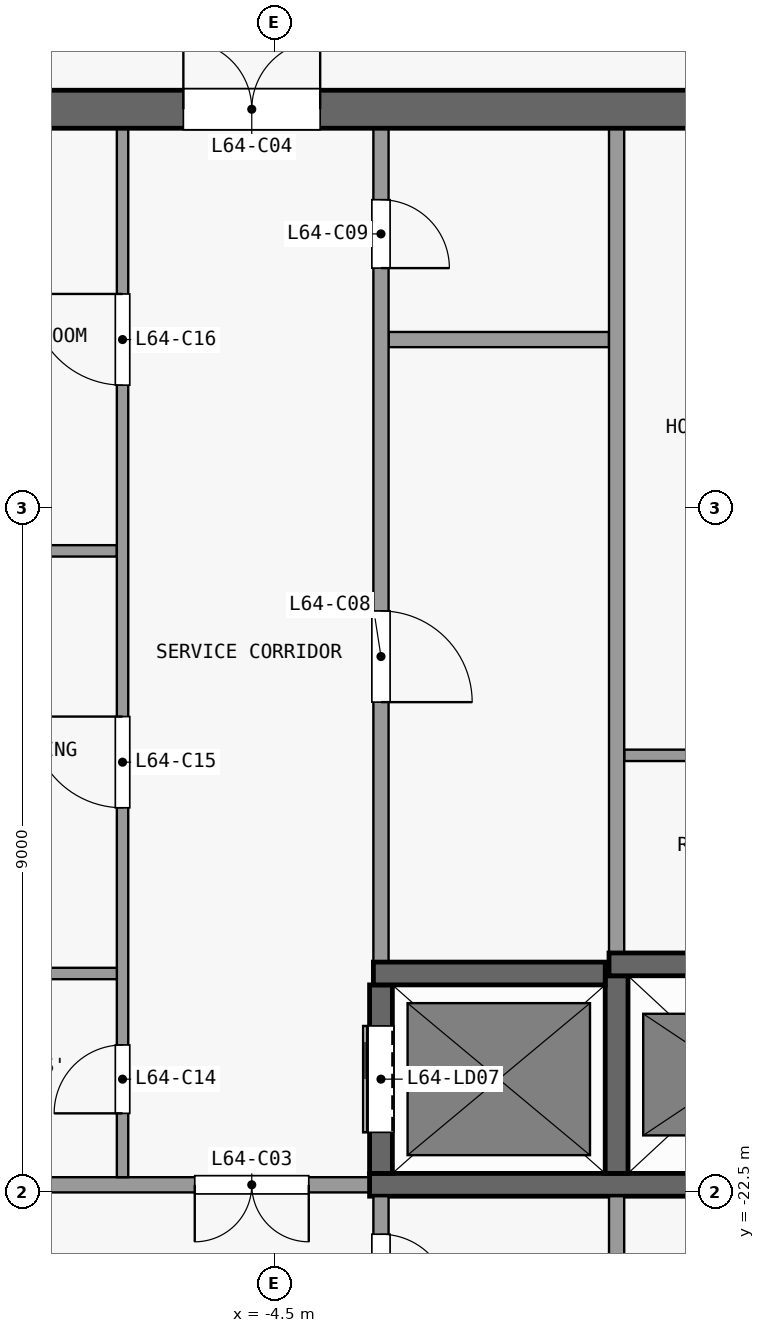
"""IFC4 building model, lengths in metres.
Left out: names, types, materials, properties, quantities, classifications, styles, units other than length and angle.
Written with IfcOpenShell. Run it as: python <this file> out.ifc"""

import sys

from ifc_helpers import new_model, si_unit, direction, frame, frame_2d, origin, place, context, subcontext, project, spatial, rectangle, extrude, element, fill, save


model = new_model("IFC4")
c1 = context("Model", 3, precision=1e-05, world=origin(), true_north=direction((0.0, 1.0)))
c2 = subcontext(c1, "Body", "Model", "MODEL_VIEW")
j1 = project(units=[si_unit("LENGTHUNIT", "METRE"), si_unit("PLANEANGLEUNIT", "RADIAN")], contexts=[c1])
p1 = place(None, origin())
s1 = spatial("IfcSite", under=j1, at=p1, CompositionType="ELEMENT")
p2 = place(p1, origin())
s2 = spatial("IfcBuilding", under=s1, at=p2, CompositionType="ELEMENT")
p3 = place(p2, frame((0.0, 0.0, 255.5)))
s3 = spatial("IfcBuildingStorey", under=s2, at=p3, CompositionType="ELEMENT", Elevation=255.5)
p4 = place(p3, frame((-13.1, -8.25, 0.0), z_axis=(0.0, 0.0, 1.0), x_axis=(1.0, 0.0, 0.0)))
e1 = element("IfcWall", 1, at=p4, inside=s3, PredefinedType="SHEAR", context=c2, shape_type="SweptSolid", body=[
    extrude(rectangle(XDim=26.2, YDim=0.5, at=frame_2d((13.1, 0.0))), origin(), (0.0, 0.0, 1.0), 3.3),
])
p5 = place(p4, frame((7.4, 0.0, 0.0)))
e2 = element("IfcOpeningElement", 2, at=p5, cuts=e1, PredefinedType="OPENING", context=c2, shape_type="SweptSolid", body=[
    extrude(rectangle(XDim=1.8, YDim=2.1, at=frame_2d((0.9, 1.05))), frame((0.0, 0.26, 0.0), z_axis=(0.0, -1.0, 0.0), x_axis=(1.0, 0.0, 0.0)), (0.0, 0.0, 1.0), 0.52),
])
p6 = place(p4, frame((17.0, 0.0, 0.0)))
e3 = element("IfcOpeningElement", 3, at=p6, cuts=e1, PredefinedType="OPENING", context=c2, shape_type="SweptSolid", body=[
    extrude(rectangle(XDim=1.8, YDim=2.1, at=frame_2d((0.9, 1.05))), frame((0.0, 0.26, 0.0), z_axis=(0.0, -1.0, 0.0), x_axis=(1.0, 0.0, 0.0)), (0.0, 0.0, 1.0), 0.52),
])
p7 = place(p4, frame((2.325, 0.0, 0.0)))
e4 = element("IfcOpeningElement", 4, at=p7, cuts=e1, PredefinedType="OPENING", context=c2, shape_type="SweptSolid", body=[
    extrude(rectangle(XDim=0.9, YDim=2.1, at=frame_2d((0.45, 1.05))), frame((0.0, 0.26, 0.0), z_axis=(0.0, -1.0, 0.0), x_axis=(1.0, 0.0, 0.0)), (0.0, 0.0, 1.0), 0.52),
])
p8 = place(p4, frame((23.675, 0.0, 0.0)))
e5 = element("IfcOpeningElement", 5, at=p8, cuts=e1, PredefinedType="OPENING", context=c2, shape_type="SweptSolid", body=[
    extrude(rectangle(XDim=1.2, YDim=2.1, at=frame_2d((0.6, 1.05))), frame((0.0, 0.26, 0.0), z_axis=(0.0, -1.0, 0.0), x_axis=(1.0, 0.0, 0.0)), (0.0, 0.0, 1.0), 0.52),
])
p9 = place(p3, frame((-3.25, -22.4, 0.0), z_axis=(0.0, 0.0, 1.0), x_axis=(-1.0, 0.0, 0.0)))
e6 = element("IfcWall", 6, at=p9, inside=s3, PredefinedType="PARTITIONING", context=c2, shape_type="SweptSolid", body=[
    extrude(rectangle(XDim=6.2, YDim=0.2, at=frame_2d((3.1, 0.0))), origin(), (0.0, 0.0, 1.0), 3.3),
])
p10 = place(p9, frame((0.8, 0.0, 0.0)))
e7 = element("IfcOpeningElement", 7, at=p10, cuts=e6, PredefinedType="OPENING", context=c2, shape_type="SweptSolid", body=[
    extrude(rectangle(XDim=1.5, YDim=2.1, at=frame_2d((0.75, 1.05))), frame((0.0, 0.11, 0.0), z_axis=(0.0, -1.0, 0.0), x_axis=(1.0, 0.0, 0.0)), (0.0, 0.0, 1.0), 0.22),
])
p11 = place(p3, frame((-3.25, -22.4, 0.0), z_axis=(0.0, 0.0, 1.0), x_axis=(1.0, 0.0, 0.0)))
e8 = element("IfcWall", 8, at=p11, inside=s3, PredefinedType="SHEAR", context=c2, shape_type="SweptSolid", body=[
    extrude(rectangle(XDim=6.5, YDim=0.3, at=frame_2d((3.25, 0.0))), origin(), (0.0, 0.0, 1.0), 3.3),
])
p12 = place(p3, frame((-9.45, -19.62, 0.0), z_axis=(0.0, 0.0, 1.0), x_axis=(1.0, 0.0, 0.0)))
e9 = element("IfcWall", 9, at=p12, inside=s3, PredefinedType="PARTITIONING", context=c2, shape_type="SweptSolid", body=[
    extrude(rectangle(XDim=2.875, YDim=0.15, at=frame_2d((1.438, 0.0))), origin(), (0.0, 0.0, 1.0), 3.3),
])
p13 = place(p3, frame((-3.2, -19.62, 0.0), z_axis=(0.0, 0.0, 1.0), x_axis=(1.0, 0.0, 0.0)))
e10 = element("IfcWall", 10, at=p13, inside=s3, PredefinedType="SHEAR", context=c2, shape_type="SweptSolid", body=[
    extrude(rectangle(XDim=3.05, YDim=0.3, at=frame_2d((1.525, 0.0))), origin(), (0.0, 0.0, 1.0), 3.3),
])
p14 = place(p3, frame((-0.1, -19.5, 0.0), z_axis=(0.0, 0.0, 1.0), x_axis=(1.0, 0.0, 0.0)))
e11 = element("IfcWall", 11, at=p14, inside=s3, PredefinedType="SHEAR", context=c2, shape_type="SweptSolid", body=[
    extrude(rectangle(XDim=3.275, YDim=0.3, at=frame_2d((1.638, 0.0))), origin(), (0.0, 0.0, 1.0), 3.3),
])
p15 = place(p3, frame((0.1, -16.75, 0.0), z_axis=(0.0, 0.0, 1.0), x_axis=(1.0, 0.0, 0.0)))
e12 = element("IfcWall", 12, at=p15, inside=s3, PredefinedType="PARTITIONING", context=c2, shape_type="SweptSolid", body=[
    extrude(rectangle(XDim=2.925, YDim=0.15, at=frame_2d((1.462, 0.0))), origin(), (0.0, 0.0, 1.0), 3.3),
])
p16 = place(p3, frame((-9.5, -14.06, 0.0), z_axis=(0.0, 0.0, 1.0), x_axis=(1.0, 0.0, 0.0)))
e13 = element("IfcWall", 13, at=p16, inside=s3, PredefinedType="PARTITIONING", context=c2, shape_type="SweptSolid", body=[
    extrude(rectangle(XDim=2.925, YDim=0.15, at=frame_2d((1.462, 0.0))), origin(), (0.0, 0.0, 1.0), 3.3),
])
p17 = place(p3, frame((-3.0, -11.28, 0.0), z_axis=(0.0, 0.0, 1.0), x_axis=(1.0, 0.0, 0.0)))
e14 = element("IfcWall", 14, at=p17, inside=s3, PredefinedType="PARTITIONING", context=c2, shape_type="SweptSolid", body=[
    extrude(rectangle(XDim=2.9, YDim=0.2, at=frame_2d((1.45, 0.0))), origin(), (0.0, 0.0, 1.0), 3.3),
])
p18 = place(p3, frame((-6.5, -22.3, 0.0), z_axis=(0.0, 0.0, 1.0), x_axis=(0.0, 1.0, 0.0)))
e15 = element("IfcWall", 15, at=p18, inside=s3, PredefinedType="PARTITIONING", context=c2, shape_type="SweptSolid", body=[
    extrude(rectangle(XDim=13.8, YDim=0.15, at=frame_2d((6.9, 0.0))), origin(), (0.0, 0.0, 1.0), 3.3),
])
p19 = place(p18, frame((0.84, 0.0, 0.0)))
e16 = element("IfcOpeningElement", 16, at=p19, cuts=e15, PredefinedType="OPENING", context=c2, shape_type="SweptSolid", body=[
    extrude(rectangle(XDim=0.9, YDim=2.1, at=frame_2d((0.45, 1.05))), frame((0.0, 0.085, 0.0), z_axis=(0.0, -1.0, 0.0), x_axis=(1.0, 0.0, 0.0)), (0.0, 0.0, 1.0), 0.17),
])
p20 = place(p18, frame((4.86, 0.0, 0.0)))
e17 = element("IfcOpeningElement", 17, at=p20, cuts=e15, PredefinedType="OPENING", context=c2, shape_type="SweptSolid", body=[
    extrude(rectangle(XDim=1.2, YDim=2.1, at=frame_2d((0.6, 1.05))), frame((0.0, 0.085, 0.0), z_axis=(0.0, -1.0, 0.0), x_axis=(1.0, 0.0, 0.0)), (0.0, 0.0, 1.0), 0.17),
])
p21 = place(p18, frame((10.42, 0.0, 0.0)))
e18 = element("IfcOpeningElement", 18, at=p21, cuts=e15, PredefinedType="OPENING", context=c2, shape_type="SweptSolid", body=[
    extrude(rectangle(XDim=1.2, YDim=2.1, at=frame_2d((0.6, 1.05))), frame((0.0, 0.085, 0.0), z_axis=(0.0, -1.0, 0.0), x_axis=(1.0, 0.0, 0.0)), (0.0, 0.0, 1.0), 0.17),
])
p22 = place(p3, frame((-3.1, -22.55, 0.0), z_axis=(0.0, 0.0, 1.0), x_axis=(0.0, -1.0, 0.0)))
e19 = element("IfcWall", 19, at=p22, inside=s3, PredefinedType="PARTITIONING", context=c2, shape_type="SweptSolid", body=[
    extrude(rectangle(XDim=2.05, YDim=0.2, at=frame_2d((1.025, 0.0))), origin(), (0.0, 0.0, 1.0), 3.3),
])
p23 = place(p22, frame((0.5, 0.0, 0.0)))
e20 = element("IfcOpeningElement", 20, at=p23, cuts=e19, PredefinedType="OPENING", context=c2, shape_type="SweptSolid", body=[
    extrude(rectangle(XDim=0.9, YDim=2.1, at=frame_2d((0.45, 1.05))), frame((0.0, 0.11, 0.0), z_axis=(0.0, -1.0, 0.0), x_axis=(1.0, 0.0, 0.0)), (0.0, 0.0, 1.0), 0.22),
])
p24 = place(p3, frame((-3.1, -22.25, 0.0), z_axis=(0.0, 0.0, 1.0), x_axis=(0.0, 1.0, 0.0)))
e21 = element("IfcWall", 21, at=p24, inside=s3, PredefinedType="SHEAR", context=c2, shape_type="SweptSolid", body=[
    extrude(rectangle(XDim=2.48, YDim=0.3, at=frame_2d((1.24, 0.0))), origin(), (0.0, 0.0, 1.0), 3.3),
])
p25 = place(p24, frame((0.54, 0.0, 0.0)))
e22 = element("IfcOpeningElement", 22, at=p25, cuts=e21, PredefinedType="OPENING", context=c2, shape_type="SweptSolid", body=[
    extrude(rectangle(XDim=1.4, YDim=2.1, at=frame_2d((0.7, 1.05))), frame((0.0, 0.16, 0.0), z_axis=(0.0, -1.0, 0.0), x_axis=(1.0, 0.0, 0.0)), (0.0, 0.0, 1.0), 0.32),
])
p26 = place(p3, frame((-3.1, -8.5, 0.0), z_axis=(0.0, 0.0, 1.0), x_axis=(0.0, -1.0, 0.0)))
e23 = element("IfcWall", 23, at=p26, inside=s3, PredefinedType="PARTITIONING", context=c2, shape_type="SweptSolid", body=[
    extrude(rectangle(XDim=10.97, YDim=0.2, at=frame_2d((5.485, 0.0))), origin(), (0.0, 0.0, 1.0), 3.3),
])
p27 = place(p26, frame((6.35, 0.0, 0.0)))
e24 = element("IfcOpeningElement", 24, at=p27, cuts=e23, PredefinedType="OPENING", context=c2, shape_type="SweptSolid", body=[
    extrude(rectangle(XDim=1.2, YDim=2.1, at=frame_2d((0.6, 1.05))), frame((0.0, 0.11, 0.0), z_axis=(0.0, -1.0, 0.0), x_axis=(1.0, 0.0, 0.0)), (0.0, 0.0, 1.0), 0.22),
])
p28 = place(p26, frame((0.94, 0.0, 0.0)))
e25 = element("IfcOpeningElement", 25, at=p28, cuts=e23, PredefinedType="OPENING", context=c2, shape_type="SweptSolid", body=[
    extrude(rectangle(XDim=0.9, YDim=2.1, at=frame_2d((0.45, 1.05))), frame((0.0, 0.11, 0.0), z_axis=(0.0, -1.0, 0.0), x_axis=(1.0, 0.0, 0.0)), (0.0, 0.0, 1.0), 0.22),
])
p29 = place(p3, frame((0.0, -24.6, 0.0), z_axis=(0.0, 0.0, 1.0), x_axis=(0.0, 1.0, 0.0)))
e26 = element("IfcWall", 26, at=p29, inside=s3, PredefinedType="PARTITIONING", context=c2, shape_type="SweptSolid", body=[
    extrude(rectangle(XDim=2.05, YDim=0.2, at=frame_2d((1.025, 0.0))), origin(), (0.0, 0.0, 1.0), 3.3),
])
p30 = place(p3, frame((0.0, -22.25, 0.0), z_axis=(0.0, 0.0, 1.0), x_axis=(0.0, 1.0, 0.0)))
e27 = element("IfcWall", 27, at=p30, inside=s3, PredefinedType="SHEAR", context=c2, shape_type="SweptSolid", body=[
    extrude(rectangle(XDim=2.6, YDim=0.3, at=frame_2d((1.3, 0.0))), origin(), (0.0, 0.0, 1.0), 3.3),
])
p31 = place(p3, frame((0.0, -19.35, 0.0), z_axis=(0.0, 0.0, 1.0), x_axis=(0.0, 1.0, 0.0)))
e28 = element("IfcWall", 28, at=p31, inside=s3, PredefinedType="PARTITIONING", context=c2, shape_type="SweptSolid", body=[
    extrude(rectangle(XDim=10.85, YDim=0.2, at=frame_2d((5.425, 0.0))), origin(), (0.0, 0.0, 1.0), 3.3),
])
p32 = place(p25, origin())
e29 = element("IfcDoor", 29, at=p32, inside=s3, OperationType="DOUBLE_DOOR_SLIDING", PredefinedType="DOOR", context=c2, shape_type="SweptSolid", body=[
    extrude(rectangle(XDim=1.4, YDim=2.1, at=frame_2d((0.7, 1.05))), frame((0.0, 0.025, 0.0), z_axis=(0.0, -1.0, 0.0), x_axis=(1.0, 0.0, 0.0)), (0.0, 0.0, 1.0), 0.05),
])
fill(e22, e29)
p33 = place(p10, origin())
e30 = element("IfcDoor", 30, at=p33, inside=s3, OperationType="DOUBLE_DOOR_SINGLE_SWING", PredefinedType="DOOR", context=c2, shape_type="SweptSolid", body=[
    extrude(rectangle(XDim=1.5, YDim=2.1, at=frame_2d((0.75, 1.05))), frame((0.0, 0.025, 0.0), z_axis=(0.0, -1.0, 0.0), x_axis=(1.0, 0.0, 0.0)), (0.0, 0.0, 1.0), 0.05),
])
fill(e7, e30)
p34 = place(p5, origin())
e31 = element("IfcDoor", 31, at=p34, inside=s3, OperationType="DOUBLE_DOOR_SINGLE_SWING", PredefinedType="DOOR", context=c2, shape_type="SweptSolid", body=[
    extrude(rectangle(XDim=1.8, YDim=2.1, at=frame_2d((0.9, 1.05))), frame((0.0, 0.025, 0.0), z_axis=(0.0, -1.0, 0.0), x_axis=(1.0, 0.0, 0.0)), (0.0, 0.0, 1.0), 0.05),
])
fill(e2, e31)
p35 = place(p27, origin())
e32 = element("IfcDoor", 32, at=p35, inside=s3, OperationType="SINGLE_SWING_RIGHT", PredefinedType="DOOR", context=c2, shape_type="SweptSolid", body=[
    extrude(rectangle(XDim=1.2, YDim=2.1, at=frame_2d((0.6, 1.05))), frame((0.0, 0.025, 0.0), z_axis=(0.0, -1.0, 0.0), x_axis=(1.0, 0.0, 0.0)), (0.0, 0.0, 1.0), 0.05),
])
fill(e24, e32)
p36 = place(p28, origin())
e33 = element("IfcDoor", 33, at=p36, inside=s3, OperationType="SINGLE_SWING_RIGHT", PredefinedType="DOOR", context=c2, shape_type="SweptSolid", body=[
    extrude(rectangle(XDim=0.9, YDim=2.1, at=frame_2d((0.45, 1.05))), frame((0.0, 0.025, 0.0), z_axis=(0.0, -1.0, 0.0), x_axis=(1.0, 0.0, 0.0)), (0.0, 0.0, 1.0), 0.05),
])
fill(e25, e33)
p37 = place(p23, origin())
e34 = element("IfcDoor", 34, at=p37, inside=s3, OperationType="SINGLE_SWING_RIGHT", PredefinedType="DOOR", context=c2, shape_type="SweptSolid", body=[
    extrude(rectangle(XDim=0.9, YDim=2.1, at=frame_2d((0.45, 1.05))), frame((0.0, 0.025, 0.0), z_axis=(0.0, -1.0, 0.0), x_axis=(1.0, 0.0, 0.0)), (0.0, 0.0, 1.0), 0.05),
])
fill(e20, e34)
p38 = place(p19, origin())
e35 = element("IfcDoor", 35, at=p38, inside=s3, OperationType="SINGLE_SWING_LEFT", PredefinedType="DOOR", context=c2, shape_type="SweptSolid", body=[
    extrude(rectangle(XDim=0.9, YDim=2.1, at=frame_2d((0.45, 1.05))), frame((0.0, 0.025, 0.0), z_axis=(0.0, -1.0, 0.0), x_axis=(1.0, 0.0, 0.0)), (0.0, 0.0, 1.0), 0.05),
])
fill(e16, e35)
p39 = place(p20, origin())
e36 = element("IfcDoor", 36, at=p39, inside=s3, OperationType="SINGLE_SWING_RIGHT", PredefinedType="DOOR", context=c2, shape_type="SweptSolid", body=[
    extrude(rectangle(XDim=1.2, YDim=2.1, at=frame_2d((0.6, 1.05))), frame((0.0, 0.025, 0.0), z_axis=(0.0, -1.0, 0.0), x_axis=(1.0, 0.0, 0.0)), (0.0, 0.0, 1.0), 0.05),
])
fill(e17, e36)
p40 = place(p21, origin())
e37 = element("IfcDoor", 37, at=p40, inside=s3, OperationType="SINGLE_SWING_RIGHT", PredefinedType="DOOR", context=c2, shape_type="SweptSolid", body=[
    extrude(rectangle(XDim=1.2, YDim=2.1, at=frame_2d((0.6, 1.05))), frame((0.0, 0.025, 0.0), z_axis=(0.0, -1.0, 0.0), x_axis=(1.0, 0.0, 0.0)), (0.0, 0.0, 1.0), 0.05),
])
fill(e18, e37)
save(model, sys.argv[1])
